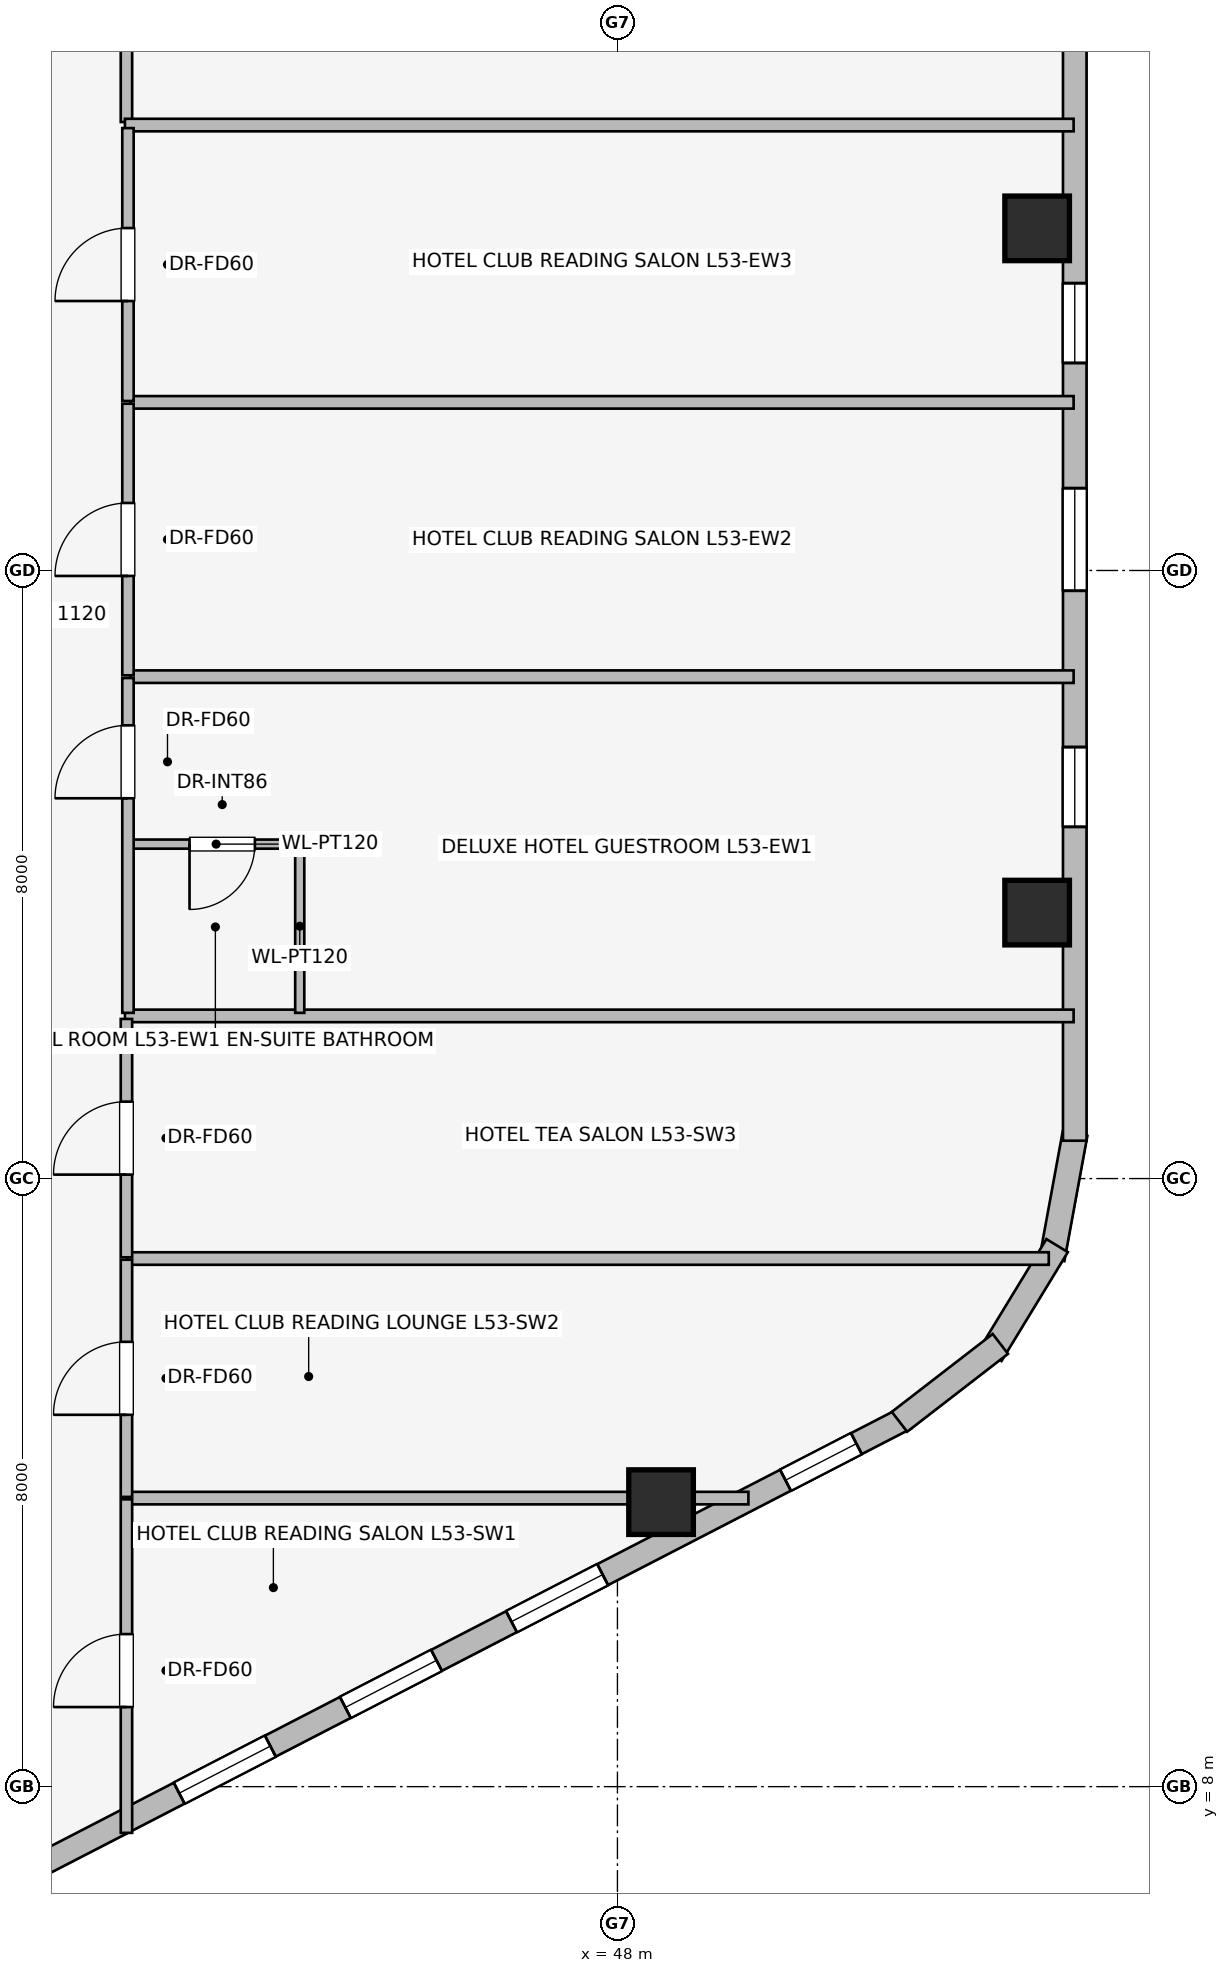
"""IFC4 building model, lengths in metres.
Left out: names, types, materials, properties, quantities, classifications, styles, units other than length and angle.
Written with IfcOpenShell. Run it as: python <this file> out.ifc"""

import sys

from ifc_helpers import new_model, si_unit, direction, frame, frame_2d, origin, origin_2d, place, context, subcontext, project, spatial, rectangle, extrude, element, fill, save


model = new_model("IFC4")
c1 = context("Model", 3, precision=1e-05, world=origin(), true_north=direction((0.0, 1.0)))
c2 = subcontext(c1, "Body", "Model", "MODEL_VIEW")
j1 = project(units=[si_unit("LENGTHUNIT", "METRE"), si_unit("PLANEANGLEUNIT", "RADIAN")], contexts=[c1])
p1 = place(None, origin())
s1 = spatial("IfcSite", under=j1, at=p1, CompositionType="ELEMENT")
p2 = place(p1, origin())
s2 = spatial("IfcBuilding", under=s1, at=p2, CompositionType="ELEMENT")
p3 = place(p2, frame((0.0, 0.0, 196.45)))
s3 = spatial("IfcBuildingStorey", under=s2, at=p3, CompositionType="ELEMENT", Elevation=196.45)
for number, where, z_axis, x_axis in (
    (1, (48.574, 11.743, 0.0), (0.0, 0.0, 1.0), (1.0, 0.0, 0.0)),
    (2, (53.522, 19.499, 0.0), (0.0, 0.0, 1.0), (1.0, 0.0, 0.0)),
    (3, (53.522, 28.501, 0.0), (0.0, 0.0, 1.0), (1.0, 0.0, 0.0)),
):
    element("IfcColumn", number, at=place(p3, frame(where, z_axis=z_axis, x_axis=x_axis)), inside=s3, PredefinedType="COLUMN", context=c2, shape_type="SweptSolid", body=[
        extrude(rectangle(XDim=0.85, YDim=0.85, at=origin_2d()), origin(), (0.0, 0.0, 1.0), 3.45),
    ])
p4 = place(p3, frame((51.792, 12.847, 0.0), z_axis=(0.0, 0.0, 1.0), x_axis=(-0.888626188278, -0.458632202867, 0.0)))
e4 = element("IfcWall", 4, at=p4, inside=s3, PredefinedType="STANDARD", context=c2, shape_type="SweptSolid", body=[
    extrude(rectangle(XDim=16.828, YDim=0.31, at=frame_2d((8.414, 0.0))), origin(), (0.0, 0.0, 1.0), 3.19),
])
p5 = place(p4, frame((0.729, 0.0, 0.75)))
e5 = element("IfcOpeningElement", 5, at=p5, cuts=e4, PredefinedType="OPENING", context=c2, shape_type="SweptSolid", body=[
    extrude(rectangle(XDim=1.05, YDim=1.4, at=frame_2d((0.525, 0.7))), frame((0.0, 0.165, 0.0), z_axis=(0.0, -1.0, 0.0), x_axis=(1.0, 0.0, 0.0)), (0.0, 0.0, 1.0), 0.33),
])
p6 = place(p4, frame((4.486, 0.0, 0.75)))
e6 = element("IfcOpeningElement", 6, at=p6, cuts=e4, PredefinedType="OPENING", context=c2, shape_type="SweptSolid", body=[
    extrude(rectangle(XDim=1.35, YDim=1.45, at=frame_2d((0.675, 0.725))), frame((0.0, 0.165, 0.0), z_axis=(0.0, -1.0, 0.0), x_axis=(1.0, 0.0, 0.0)), (0.0, 0.0, 1.0), 0.33),
])
p7 = place(p4, frame((6.946, 0.0, 0.75)))
e7 = element("IfcOpeningElement", 7, at=p7, cuts=e4, PredefinedType="OPENING", context=c2, shape_type="SweptSolid", body=[
    extrude(rectangle(XDim=1.35, YDim=1.45, at=frame_2d((0.675, 0.725))), frame((0.0, 0.165, 0.0), z_axis=(0.0, -1.0, 0.0), x_axis=(1.0, 0.0, 0.0)), (0.0, 0.0, 1.0), 0.33),
])
p8 = place(p4, frame((9.406, 0.0, 0.75)))
e8 = element("IfcOpeningElement", 8, at=p8, cuts=e4, PredefinedType="OPENING", context=c2, shape_type="SweptSolid", body=[
    extrude(rectangle(XDim=1.35, YDim=1.45, at=frame_2d((0.675, 0.725))), frame((0.0, 0.165, 0.0), z_axis=(0.0, -1.0, 0.0), x_axis=(1.0, 0.0, 0.0)), (0.0, 0.0, 1.0), 0.33),
])
p9 = place(p4, frame((14.153, 0.0, 0.75)))
e9 = element("IfcOpeningElement", 9, at=p9, cuts=e4, PredefinedType="OPENING", context=c2, shape_type="SweptSolid", body=[
    extrude(rectangle(XDim=2.0, YDim=1.5, at=frame_2d((1.0, 0.75))), frame((0.0, 0.165, 0.0), z_axis=(0.0, -1.0, 0.0), x_axis=(1.0, 0.0, 0.0)), (0.0, 0.0, 1.0), 0.33),
])
p10 = place(p3, frame((54.021, 16.592, 0.0), z_axis=(0.0, 0.0, 1.0), x_axis=(-0.180717642671, -0.983535019014, 0.0)))
e10 = element("IfcWall", 10, at=p10, inside=s3, PredefinedType="STANDARD", context=c2, shape_type="SweptSolid", body=[
    extrude(rectangle(XDim=1.677, YDim=0.33, at=frame_2d((0.838, 0.0))), origin(), (0.0, 0.0, 1.0), 3.19),
])
p11 = place(p3, frame((53.785, 15.118, 0.0), z_axis=(0.0, 0.0, 1.0), x_axis=(-0.520219286058, -0.85403272444, 0.0)))
e11 = element("IfcWall", 11, at=p11, inside=s3, PredefinedType="STANDARD", context=c2, shape_type="SweptSolid", body=[
    extrude(rectangle(XDim=1.678, YDim=0.33, at=frame_2d((0.839, 0.0))), origin(), (0.0, 0.0, 1.0), 3.19),
])
p12 = place(p3, frame((53.038, 13.825, 0.0), z_axis=(0.0, 0.0, 1.0), x_axis=(-0.791464279355, -0.611215423976, 0.0)))
e12 = element("IfcWall", 12, at=p12, inside=s3, PredefinedType="STANDARD", context=c2, shape_type="SweptSolid", body=[
    extrude(rectangle(XDim=1.677, YDim=0.33, at=frame_2d((0.838, 0.0))), origin(), (0.0, 0.0, 1.0), 3.19),
])
p13 = place(p3, frame((54.017, 31.502, 0.0), z_axis=(0.0, 0.0, 1.0), x_axis=(0.0, -1.0, 0.0)))
e13 = element("IfcWall", 13, at=p13, inside=s3, PredefinedType="STANDARD", context=c2, shape_type="SweptSolid", body=[
    extrude(rectangle(XDim=15.004, YDim=0.31, at=frame_2d((7.502, 0.0))), origin(), (0.0, 0.0, 1.0), 3.19),
])
p14 = place(p13, frame((3.722, 0.0, 0.75)))
e14 = element("IfcOpeningElement", 14, at=p14, cuts=e13, PredefinedType="OPENING", context=c2, shape_type="SweptSolid", body=[
    extrude(rectangle(XDim=1.05, YDim=1.4, at=frame_2d((0.525, 0.7))), frame((0.0, 0.165, 0.0), z_axis=(0.0, -1.0, 0.0), x_axis=(1.0, 0.0, 0.0)), (0.0, 0.0, 1.0), 0.33),
])
p15 = place(p13, frame((6.419, 0.0, 0.75)))
e15 = element("IfcOpeningElement", 15, at=p15, cuts=e13, PredefinedType="OPENING", context=c2, shape_type="SweptSolid", body=[
    extrude(rectangle(XDim=1.35, YDim=1.45, at=frame_2d((0.675, 0.725))), frame((0.0, 0.165, 0.0), z_axis=(0.0, -1.0, 0.0), x_axis=(1.0, 0.0, 0.0)), (0.0, 0.0, 1.0), 0.33),
])
p16 = place(p13, frame((9.825, 0.0, 0.75)))
e16 = element("IfcOpeningElement", 16, at=p16, cuts=e13, PredefinedType="OPENING", context=c2, shape_type="SweptSolid", body=[
    extrude(rectangle(XDim=1.05, YDim=1.4, at=frame_2d((0.525, 0.7))), frame((0.0, 0.165, 0.0), z_axis=(0.0, -1.0, 0.0), x_axis=(1.0, 0.0, 0.0)), (0.0, 0.0, 1.0), 0.33),
])
p17 = place(p3, frame((41.54, 40.275, 0.0), z_axis=(0.0, 0.0, 1.0), x_axis=(0.0, -1.0, 0.0)))
e17 = element("IfcWall", 17, at=p17, inside=s3, PredefinedType="PARTITIONING", context=c2, shape_type="SweptSolid", body=[
    extrude(rectangle(XDim=10.375, YDim=0.15, at=frame_2d((5.188, 0.0))), origin(), (0.0, 0.0, 1.0), 3.19),
])
p18 = place(p17, frame((4.745, 0.0, 0.0)))
e18 = element("IfcOpeningElement", 18, at=p18, cuts=e17, PredefinedType="OPENING", context=c2, shape_type="SweptSolid", body=[
    extrude(rectangle(XDim=0.96, YDim=2.0, at=frame_2d((0.48, 1.0))), frame((0.0, 0.085, 0.0), z_axis=(0.0, -1.0, 0.0), x_axis=(1.0, 0.0, 0.0)), (0.0, 0.0, 1.0), 0.17),
])
for number, where, z_axis, x_axis in (
    (19, (41.52, 18.14, 0.0), (0.0, 0.0, 1.0), (1.0, 0.0, 0.0)),
    (20, (41.52, 29.86, 0.0), (0.0, 0.0, 1.0), (1.0, 0.0, 0.0)),
):
    element("IfcWall", number, at=place(p3, frame(where, z_axis=z_axis, x_axis=x_axis)), inside=s3, PredefinedType="PARTITIONING", context=c2, shape_type="SweptSolid", body=[
        extrude(rectangle(XDim=12.482, YDim=0.165, at=frame_2d((6.241, 0.0))), origin(), (0.0, 0.0, 1.0), 3.19),
    ])
for number, where, z_axis, x_axis in (
    (21, (41.59, 22.603, 0.0), (0.0, 0.0, 1.0), (1.0, 0.0, 0.0)),
    (22, (41.59, 26.212, 0.0), (0.0, 0.0, 1.0), (1.0, 0.0, 0.0)),
):
    element("IfcWall", number, at=place(p3, frame(where, z_axis=z_axis, x_axis=x_axis)), inside=s3, PredefinedType="PARTITIONING", context=c2, shape_type="SweptSolid", body=[
        extrude(rectangle(XDim=12.412, YDim=0.165, at=frame_2d((6.206, 0.0))), origin(), (0.0, 0.0, 1.0), 3.19),
    ])
p19 = place(p3, frame((43.82, 18.18, 0.0), z_axis=(0.0, 0.0, 1.0), x_axis=(0.0, 1.0, 0.0)))
e23 = element("IfcWall", 23, at=p19, inside=s3, PredefinedType="PARTITIONING", context=c2, shape_type="SweptSolid", body=[
    extrude(rectangle(XDim=2.28, YDim=0.12, at=frame_2d((1.14, 0.0))), origin(), (0.0, 0.0, 1.0), 3.19),
])
p20 = place(p3, frame((43.88, 20.4, 0.0), z_axis=(0.0, 0.0, 1.0), x_axis=(-1.0, 0.0, 0.0)))
e24 = element("IfcWall", 24, at=p20, inside=s3, PredefinedType="PARTITIONING", context=c2, shape_type="SweptSolid", body=[
    extrude(rectangle(XDim=2.32, YDim=0.12, at=frame_2d((1.16, 0.0))), origin(), (0.0, 0.0, 1.0), 3.19),
])
p21 = place(p20, frame((0.65, 0.0, 0.0)))
e25 = element("IfcOpeningElement", 25, at=p21, cuts=e24, PredefinedType="OPENING", context=c2, shape_type="SweptSolid", body=[
    extrude(rectangle(XDim=0.86, YDim=2.0, at=frame_2d((0.43, 1.0))), frame((0.0, 0.07, 0.0), z_axis=(0.0, -1.0, 0.0), x_axis=(1.0, 0.0, 0.0)), (0.0, 0.0, 1.0), 0.14),
])
p22 = place(p3, frame((41.56, 18.18, 0.0), z_axis=(0.0, 0.0, 1.0), x_axis=(0.0, 1.0, 0.0)))
e26 = element("IfcWall", 26, at=p22, inside=s3, PredefinedType="PARTITIONING", context=c2, shape_type="SweptSolid", body=[
    extrude(rectangle(XDim=4.405, YDim=0.15, at=frame_2d((2.203, 0.0))), origin(), (0.0, 0.0, 1.0), 3.19),
])
p23 = place(p22, frame((2.823, 0.0, 0.0)))
e27 = element("IfcOpeningElement", 27, at=p23, cuts=e26, PredefinedType="OPENING", context=c2, shape_type="SweptSolid", body=[
    extrude(rectangle(XDim=0.96, YDim=2.0, at=frame_2d((0.48, 1.0))), frame((0.0, 0.085, 0.0), z_axis=(0.0, -1.0, 0.0), x_axis=(1.0, 0.0, 0.0)), (0.0, 0.0, 1.0), 0.17),
])
p24 = place(p3, frame((41.56, 22.621, 0.0), z_axis=(0.0, 0.0, 1.0), x_axis=(0.0, 1.0, 0.0)))
e28 = element("IfcWall", 28, at=p24, inside=s3, PredefinedType="PARTITIONING", context=c2, shape_type="SweptSolid", body=[
    extrude(rectangle(XDim=3.573, YDim=0.15, at=frame_2d((1.787, 0.0))), origin(), (0.0, 0.0, 1.0), 3.19),
])
p25 = place(p24, frame((1.307, 0.0, 0.0)))
e29 = element("IfcOpeningElement", 29, at=p25, cuts=e28, PredefinedType="OPENING", context=c2, shape_type="SweptSolid", body=[
    extrude(rectangle(XDim=0.96, YDim=2.0, at=frame_2d((0.48, 1.0))), frame((0.0, 0.085, 0.0), z_axis=(0.0, -1.0, 0.0), x_axis=(1.0, 0.0, 0.0)), (0.0, 0.0, 1.0), 0.17),
])
p26 = place(p3, frame((41.56, 26.23, 0.0), z_axis=(0.0, 0.0, 1.0), x_axis=(0.0, 1.0, 0.0)))
e30 = element("IfcWall", 30, at=p26, inside=s3, PredefinedType="PARTITIONING", context=c2, shape_type="SweptSolid", body=[
    extrude(rectangle(XDim=3.59, YDim=0.15, at=frame_2d((1.795, 0.0))), origin(), (0.0, 0.0, 1.0), 3.19),
])
p27 = place(p26, frame((1.315, 0.0, 0.0)))
e31 = element("IfcOpeningElement", 31, at=p27, cuts=e30, PredefinedType="OPENING", context=c2, shape_type="SweptSolid", body=[
    extrude(rectangle(XDim=0.96, YDim=2.0, at=frame_2d((0.48, 1.0))), frame((0.0, 0.085, 0.0), z_axis=(0.0, -1.0, 0.0), x_axis=(1.0, 0.0, 0.0)), (0.0, 0.0, 1.0), 0.17),
])
p28 = place(p3, frame((41.55, 11.796, 0.0), z_axis=(0.0, 0.0, 1.0), x_axis=(1.0, 0.0, 0.0)))
e32 = element("IfcWall", 32, at=p28, inside=s3, PredefinedType="PARTITIONING", context=c2, shape_type="SweptSolid", body=[
    extrude(rectangle(XDim=8.173, YDim=0.165, at=frame_2d((4.086, 0.0))), origin(), (0.0, 0.0, 1.0), 3.19),
])
p29 = place(p3, frame((41.55, 14.948, 0.0), z_axis=(0.0, 0.0, 1.0), x_axis=(1.0, 0.0, 0.0)))
e33 = element("IfcWall", 33, at=p29, inside=s3, PredefinedType="PARTITIONING", context=c2, shape_type="SweptSolid", body=[
    extrude(rectangle(XDim=12.125, YDim=0.165, at=frame_2d((6.062, 0.0))), origin(), (0.0, 0.0, 1.0), 3.19),
])
p30 = place(p3, frame((41.54, 7.392, 0.0), z_axis=(0.0, 0.0, 1.0), x_axis=(0.0, 1.0, 0.0)))
e34 = element("IfcWall", 34, at=p30, inside=s3, PredefinedType="PARTITIONING", context=c2, shape_type="SweptSolid", body=[
    extrude(rectangle(XDim=4.388, YDim=0.15, at=frame_2d((2.194, 0.0))), origin(), (0.0, 0.0, 1.0), 3.19),
])
p31 = place(p30, frame((1.655, 0.0, 0.0)))
e35 = element("IfcOpeningElement", 35, at=p31, cuts=e34, PredefinedType="OPENING", context=c2, shape_type="SweptSolid", body=[
    extrude(rectangle(XDim=0.96, YDim=2.0, at=frame_2d((0.48, 1.0))), frame((0.0, 0.085, 0.0), z_axis=(0.0, -1.0, 0.0), x_axis=(1.0, 0.0, 0.0)), (0.0, 0.0, 1.0), 0.17),
])
p32 = place(p3, frame((41.54, 11.812, 0.0), z_axis=(0.0, 0.0, 1.0), x_axis=(0.0, 1.0, 0.0)))
e36 = element("IfcWall", 36, at=p32, inside=s3, PredefinedType="PARTITIONING", context=c2, shape_type="SweptSolid", body=[
    extrude(rectangle(XDim=3.12, YDim=0.15, at=frame_2d((1.56, 0.0))), origin(), (0.0, 0.0, 1.0), 3.19),
])
p33 = place(p32, frame((1.08, 0.0, 0.0)))
e37 = element("IfcOpeningElement", 37, at=p33, cuts=e36, PredefinedType="OPENING", context=c2, shape_type="SweptSolid", body=[
    extrude(rectangle(XDim=0.96, YDim=2.0, at=frame_2d((0.48, 1.0))), frame((0.0, 0.085, 0.0), z_axis=(0.0, -1.0, 0.0), x_axis=(1.0, 0.0, 0.0)), (0.0, 0.0, 1.0), 0.17),
])
p34 = place(p3, frame((41.54, 14.964, 0.0), z_axis=(0.0, 0.0, 1.0), x_axis=(0.0, 1.0, 0.0)))
e38 = element("IfcWall", 38, at=p34, inside=s3, PredefinedType="PARTITIONING", context=c2, shape_type="SweptSolid", body=[
    extrude(rectangle(XDim=3.136, YDim=0.15, at=frame_2d((1.568, 0.0))), origin(), (0.0, 0.0, 1.0), 3.19),
])
p35 = place(p34, frame((1.088, 0.0, 0.0)))
e39 = element("IfcOpeningElement", 39, at=p35, cuts=e38, PredefinedType="OPENING", context=c2, shape_type="SweptSolid", body=[
    extrude(rectangle(XDim=0.96, YDim=2.0, at=frame_2d((0.48, 1.0))), frame((0.0, 0.085, 0.0), z_axis=(0.0, -1.0, 0.0), x_axis=(1.0, 0.0, 0.0)), (0.0, 0.0, 1.0), 0.17),
])
p36 = place(p5, origin())
e40 = element("IfcWindow", 40, at=p36, inside=s3, PartitioningType="SINGLE_PANEL", PredefinedType="WINDOW", context=c2, shape_type="SweptSolid", body=[
    extrude(rectangle(XDim=1.05, YDim=1.4, at=frame_2d((0.525, 0.7))), frame((0.0, 0.03, 0.0), z_axis=(0.0, -1.0, 0.0), x_axis=(1.0, 0.0, 0.0)), (0.0, 0.0, 1.0), 0.06),
])
fill(e5, e40)
p37 = place(p6, origin())
e41 = element("IfcWindow", 41, at=p37, inside=s3, PartitioningType="SINGLE_PANEL", PredefinedType="WINDOW", context=c2, shape_type="SweptSolid", body=[
    extrude(rectangle(XDim=1.35, YDim=1.45, at=frame_2d((0.675, 0.725))), frame((0.0, 0.03, 0.0), z_axis=(0.0, -1.0, 0.0), x_axis=(1.0, 0.0, 0.0)), (0.0, 0.0, 1.0), 0.06),
])
fill(e6, e41)
p38 = place(p7, origin())
e42 = element("IfcWindow", 42, at=p38, inside=s3, PartitioningType="SINGLE_PANEL", PredefinedType="WINDOW", context=c2, shape_type="SweptSolid", body=[
    extrude(rectangle(XDim=1.35, YDim=1.45, at=frame_2d((0.675, 0.725))), frame((0.0, 0.03, 0.0), z_axis=(0.0, -1.0, 0.0), x_axis=(1.0, 0.0, 0.0)), (0.0, 0.0, 1.0), 0.06),
])
fill(e7, e42)
p39 = place(p8, origin())
e43 = element("IfcWindow", 43, at=p39, inside=s3, PartitioningType="SINGLE_PANEL", PredefinedType="WINDOW", context=c2, shape_type="SweptSolid", body=[
    extrude(rectangle(XDim=1.35, YDim=1.45, at=frame_2d((0.675, 0.725))), frame((0.0, 0.03, 0.0), z_axis=(0.0, -1.0, 0.0), x_axis=(1.0, 0.0, 0.0)), (0.0, 0.0, 1.0), 0.06),
])
fill(e8, e43)
p40 = place(p14, origin())
e44 = element("IfcWindow", 44, at=p40, inside=s3, PartitioningType="SINGLE_PANEL", PredefinedType="WINDOW", context=c2, shape_type="SweptSolid", body=[
    extrude(rectangle(XDim=1.05, YDim=1.4, at=frame_2d((0.525, 0.7))), frame((0.0, 0.03, 0.0), z_axis=(0.0, -1.0, 0.0), x_axis=(1.0, 0.0, 0.0)), (0.0, 0.0, 1.0), 0.06),
])
fill(e14, e44)
p41 = place(p15, origin())
e45 = element("IfcWindow", 45, at=p41, inside=s3, PartitioningType="SINGLE_PANEL", PredefinedType="WINDOW", context=c2, shape_type="SweptSolid", body=[
    extrude(rectangle(XDim=1.35, YDim=1.45, at=frame_2d((0.675, 0.725))), frame((0.0, 0.03, 0.0), z_axis=(0.0, -1.0, 0.0), x_axis=(1.0, 0.0, 0.0)), (0.0, 0.0, 1.0), 0.06),
])
fill(e15, e45)
p42 = place(p16, origin())
e46 = element("IfcWindow", 46, at=p42, inside=s3, PartitioningType="SINGLE_PANEL", PredefinedType="WINDOW", context=c2, shape_type="SweptSolid", body=[
    extrude(rectangle(XDim=1.05, YDim=1.4, at=frame_2d((0.525, 0.7))), frame((0.0, 0.03, 0.0), z_axis=(0.0, -1.0, 0.0), x_axis=(1.0, 0.0, 0.0)), (0.0, 0.0, 1.0), 0.06),
])
fill(e16, e46)
p43 = place(p21, origin())
e47 = element("IfcDoor", 47, at=p43, inside=s3, OperationType="SINGLE_SWING_RIGHT", PredefinedType="DOOR", context=c2, shape_type="SweptSolid", body=[
    extrude(rectangle(XDim=0.86, YDim=2.0, at=frame_2d((0.43, 1.0))), frame((0.0, 0.025, 0.0), z_axis=(0.0, -1.0, 0.0), x_axis=(1.0, 0.0, 0.0)), (0.0, 0.0, 1.0), 0.05),
])
fill(e25, e47)
p44 = place(p23, origin())
e48 = element("IfcDoor", 48, at=p44, inside=s3, OperationType="SINGLE_SWING_LEFT", PredefinedType="DOOR", context=c2, shape_type="SweptSolid", body=[
    extrude(rectangle(XDim=0.96, YDim=2.0, at=frame_2d((0.48, 1.0))), frame((0.0, 0.025, 0.0), z_axis=(0.0, -1.0, 0.0), x_axis=(1.0, 0.0, 0.0)), (0.0, 0.0, 1.0), 0.05),
])
fill(e27, e48)
p45 = place(p25, origin())
e49 = element("IfcDoor", 49, at=p45, inside=s3, OperationType="SINGLE_SWING_LEFT", PredefinedType="DOOR", context=c2, shape_type="SweptSolid", body=[
    extrude(rectangle(XDim=0.96, YDim=2.0, at=frame_2d((0.48, 1.0))), frame((0.0, 0.025, 0.0), z_axis=(0.0, -1.0, 0.0), x_axis=(1.0, 0.0, 0.0)), (0.0, 0.0, 1.0), 0.05),
])
fill(e29, e49)
p46 = place(p27, origin())
e50 = element("IfcDoor", 50, at=p46, inside=s3, OperationType="SINGLE_SWING_LEFT", PredefinedType="DOOR", context=c2, shape_type="SweptSolid", body=[
    extrude(rectangle(XDim=0.96, YDim=2.0, at=frame_2d((0.48, 1.0))), frame((0.0, 0.025, 0.0), z_axis=(0.0, -1.0, 0.0), x_axis=(1.0, 0.0, 0.0)), (0.0, 0.0, 1.0), 0.05),
])
fill(e31, e50)
p47 = place(p31, origin())
e51 = element("IfcDoor", 51, at=p47, inside=s3, OperationType="SINGLE_SWING_LEFT", PredefinedType="DOOR", context=c2, shape_type="SweptSolid", body=[
    extrude(rectangle(XDim=0.96, YDim=2.0, at=frame_2d((0.48, 1.0))), frame((0.0, 0.025, 0.0), z_axis=(0.0, -1.0, 0.0), x_axis=(1.0, 0.0, 0.0)), (0.0, 0.0, 1.0), 0.05),
])
fill(e35, e51)
p48 = place(p33, origin())
e52 = element("IfcDoor", 52, at=p48, inside=s3, OperationType="SINGLE_SWING_LEFT", PredefinedType="DOOR", context=c2, shape_type="SweptSolid", body=[
    extrude(rectangle(XDim=0.96, YDim=2.0, at=frame_2d((0.48, 1.0))), frame((0.0, 0.025, 0.0), z_axis=(0.0, -1.0, 0.0), x_axis=(1.0, 0.0, 0.0)), (0.0, 0.0, 1.0), 0.05),
])
fill(e37, e52)
p49 = place(p35, origin())
e53 = element("IfcDoor", 53, at=p49, inside=s3, OperationType="SINGLE_SWING_LEFT", PredefinedType="DOOR", context=c2, shape_type="SweptSolid", body=[
    extrude(rectangle(XDim=0.96, YDim=2.0, at=frame_2d((0.48, 1.0))), frame((0.0, 0.025, 0.0), z_axis=(0.0, -1.0, 0.0), x_axis=(1.0, 0.0, 0.0)), (0.0, 0.0, 1.0), 0.05),
])
fill(e39, e53)
save(model, sys.argv[1])
